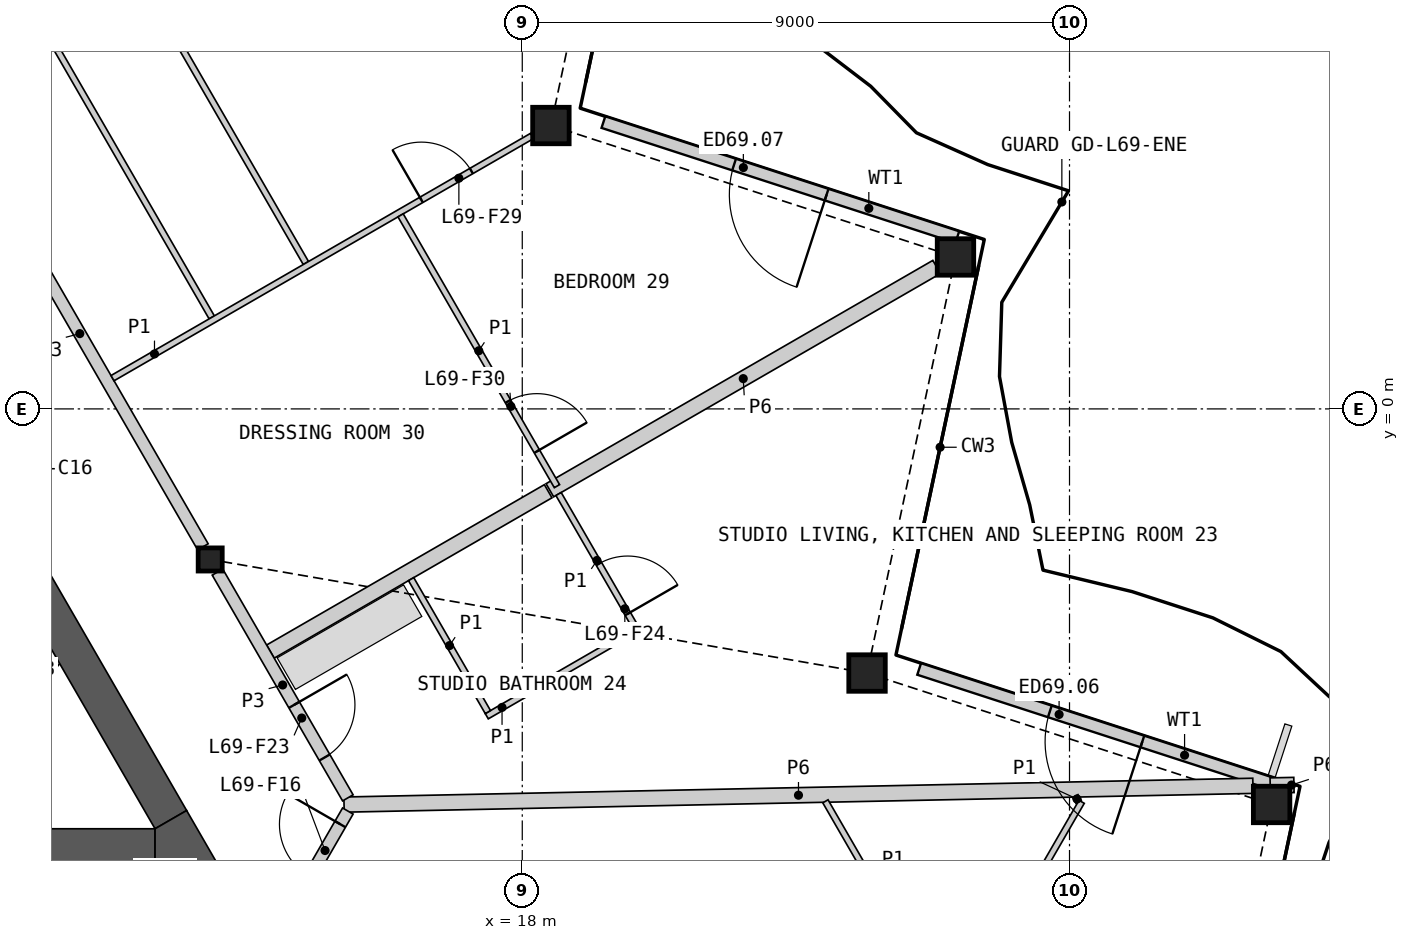
"""IFC4 building model, lengths in metres.
Left out: names, types, materials, properties, quantities, classifications, styles, units other than length and angle.
Written with IfcOpenShell. Run it as: python <this file> out.ifc"""

import sys

from ifc_helpers import new_model, si_unit, direction, frame, frame_2d, origin, origin_2d, place, context, subcontext, project, spatial, polyline, rectangle, hollow_rectangle, i_section, outline, extrude, element, fill, save


model = new_model("IFC4")
c1 = context("Model", 3, precision=1e-05, world=origin(), true_north=direction((0.0, 1.0)))
c2 = subcontext(c1, "Body", "Model", "MODEL_VIEW")
j1 = project(units=[si_unit("LENGTHUNIT", "METRE"), si_unit("PLANEANGLEUNIT", "RADIAN")], contexts=[c1])
p1 = place(None, origin())
s1 = spatial("IfcSite", under=j1, at=p1, CompositionType="ELEMENT")
p2 = place(p1, origin())
s2 = spatial("IfcBuilding", under=s1, at=p2, CompositionType="ELEMENT")
p3 = place(p2, frame((0.0, 0.0, 315.4)))
s3 = spatial("IfcBuildingStorey", under=s2, at=p3, CompositionType="ELEMENT", Elevation=315.4)
for number, where, z_axis, x_axis in (
    (1, (30.324, -6.506, 0.0), (0.0, 0.0, 1.0), (1.0, 0.0, 0.0)),
    (2, (23.67, -4.344, 0.0), (0.0, 0.0, 1.0), (1.0, 0.0, 0.0)),
    (3, (25.125, 2.499, 0.0), (0.0, 0.0, 1.0), (1.0, 0.0, 0.0)),
    (4, (18.471, 4.661, 0.0), (0.0, 0.0, 1.0), (1.0, 0.0, 0.0)),
):
    element("IfcColumn", number, at=place(p3, frame(where, z_axis=z_axis, x_axis=x_axis)), inside=s3, PredefinedType="COLUMN", context=c2, shape_type="SweptSolid", body=[
        extrude(hollow_rectangle(XDim=0.6, YDim=0.6, WallThickness=0.04, at=origin_2d()), origin(), (0.0, 0.0, 1.0), 3.4),
    ])
p4 = place(p3, frame((12.868, -2.476, 0.0), z_axis=(0.0, 0.0, 1.0), x_axis=(1.0, 0.0, 0.0)))
e5 = element("IfcColumn", 5, at=p4, inside=s3, PredefinedType="COLUMN", context=c2, shape_type="SweptSolid", body=[
    extrude(i_section(OverallWidth=0.396, OverallDepth=0.381, WebThickness=0.019, FlangeThickness=0.03, at=origin_2d()), origin(), (0.0, 0.0, 1.0), 3.4),
])
p5 = place(p3, frame((30.347, -6.168, 0.0), z_axis=(0.0, 0.0, 1.0), x_axis=(-0.951053709789, 0.309025631781, 0.0)))
e6 = element("IfcWall", 6, at=p5, inside=s3, PredefinedType="SOLIDWALL", context=c2, shape_type="SweptSolid", body=[
    extrude(rectangle(XDim=6.12, YDim=0.2, at=frame_2d((3.06, 0.0))), origin(), (0.0, 0.0, 1.0), 2.488),
])
p6 = place(p5, frame((2.26, 0.0, 0.0)))
e7 = element("IfcOpeningElement", 7, at=p6, cuts=e6, PredefinedType="OPENING", context=c2, shape_type="SweptSolid", body=[
    extrude(rectangle(XDim=1.6, YDim=2.25, at=frame_2d((0.8, 1.125))), frame((0.0, 0.11, 0.0), z_axis=(0.0, -1.0, 0.0), x_axis=(1.0, 0.0, 0.0)), (0.0, 0.0, 1.0), 0.22),
])
p7 = place(p3, frame((25.155, 2.826, 0.0), z_axis=(0.0, 0.0, 1.0), x_axis=(-0.951053709789, 0.309025631781, 0.0)))
e8 = element("IfcWall", 8, at=p7, inside=s3, PredefinedType="SOLIDWALL", context=c2, shape_type="SweptSolid", body=[
    extrude(rectangle(XDim=6.12, YDim=0.2, at=frame_2d((3.06, 0.0))), origin(), (0.0, 0.0, 1.0), 2.488),
])
p8 = place(p7, frame((2.26, 0.0, 0.0)))
e9 = element("IfcOpeningElement", 9, at=p8, cuts=e8, PredefinedType="OPENING", context=c2, shape_type="SweptSolid", body=[
    extrude(rectangle(XDim=1.6, YDim=2.25, at=frame_2d((0.8, 1.125))), frame((0.0, 0.11, 0.0), z_axis=(0.0, -1.0, 0.0), x_axis=(1.0, 0.0, 0.0)), (0.0, 0.0, 1.0), 0.22),
])
p9 = place(p3, origin())
e10 = element("IfcWall", 10, at=p9, inside=s3, PredefinedType="SHEAR", context=c2, shape_type="SweptSolid", body=[
    extrude(outline(polyline([(8.83, -6.881), (10.374, -4.206), (10.032, -4.298), (8.738, -6.539), (8.83, -6.881)])), origin(), (0.0, 0.0, 1.0), 3.1),
])
p10 = place(p3, origin())
e11 = element("IfcWall", 11, at=p10, inside=s3, PredefinedType="SHEAR", context=c2, shape_type="SweptSolid", body=[
    extrude(outline(polyline([(10.032, -4.298), (10.374, -4.206), (5.307, -1.281), (5.182, -1.498), (10.032, -4.298)])), origin(), (0.0, 0.0, 1.0), 3.1),
])
p11 = place(p3, frame((-11.961, -7.206, 0.0), z_axis=(0.0, 0.0, 1.0), x_axis=(1.0, 0.0, 0.0)))
e12 = element("IfcWall", 12, at=p11, inside=s3, PredefinedType="SHEAR", context=c2, shape_type="SweptSolid", body=[
    extrude(rectangle(XDim=23.921, YDim=0.6, at=frame_2d((11.961, 0.0))), origin(), (0.0, 0.0, 1.0), 3.1),
])
p12 = place(p3, frame((12.221, -6.756, 0.0), z_axis=(0.0, 0.0, 1.0), x_axis=(-0.50000604952, 0.866021911064, 0.0)))
e13 = element("IfcWall", 13, at=p12, inside=s3, PredefinedType="SHEAR", context=c2, shape_type="SweptSolid", body=[
    extrude(rectangle(XDim=4.869, YDim=0.6, at=frame_2d((2.434, 0.0))), origin(), (0.0, 0.0, 1.0), 3.1),
])
p13 = place(p3, origin())
e14 = element("IfcWall", 14, at=p13, inside=s3, PredefinedType="SHEAR", context=c2, shape_type="SweptSolid", body=[
    extrude(outline(polyline([(11.961, -7.506), (11.961, -6.906), (12.48, -6.606), (13.0, -7.506), (11.961, -7.506)])), origin(), (0.0, 0.0, 1.0), 3.1),
])
p14 = place(p3, frame((15.069, -6.508, 0.0), z_axis=(0.0, 0.0, 1.0), x_axis=(0.999786619639, 0.02065708573, 0.0)))
e15 = element("IfcWall", 15, at=p14, inside=s3, PredefinedType="PARTITIONING", context=c2, shape_type="SweptSolid", body=[
    extrude(rectangle(XDim=14.951, YDim=0.25, at=frame_2d((7.475, 0.0))), origin(), (0.0, 0.0, 1.0), 2.33),
])
p15 = place(p3, frame((8.698, 4.745, 0.0), z_axis=(0.0, 0.0, 1.0), x_axis=(0.499984266882, -0.866034487114, 0.0)))
e16 = element("IfcWall", 16, at=p15, inside=s3, PredefinedType="PARTITIONING", context=c2, shape_type="SweptSolid", body=[
    extrude(rectangle(XDim=8.099, YDim=0.2, at=frame_2d((4.049, 0.0))), origin(), (0.0, 0.0, 1.0), 3.1),
])
p16 = place(p3, frame((18.454, -1.338, 0.0), z_axis=(0.0, 0.0, 1.0), x_axis=(0.866023407002, 0.500003458512, 0.0)))
e17 = element("IfcWall", 17, at=p16, inside=s3, PredefinedType="PARTITIONING", context=c2, shape_type="SweptSolid", body=[
    extrude(rectangle(XDim=7.345, YDim=0.25, at=frame_2d((3.673, 0.0))), origin(), (0.0, 0.0, 1.0), 2.33),
])
p17 = place(p3, frame((13.858, -3.991, 0.0), z_axis=(0.0, 0.0, 1.0), x_axis=(0.866032983855, 0.499986870703, 0.0)))
e18 = element("IfcWall", 18, at=p17, inside=s3, PredefinedType="PARTITIONING", context=c2, shape_type="SweptSolid", body=[
    extrude(rectangle(XDim=5.275, YDim=0.25, at=frame_2d((2.638, 0.0))), origin(), (0.0, 0.0, 1.0), 2.33),
])
p18 = place(p3, frame((12.988, -2.684, 0.0), z_axis=(0.0, 0.0, 1.0), x_axis=(0.500003406062, -0.866023437285, 0.0)))
e19 = element("IfcWall", 19, at=p18, inside=s3, PredefinedType="PARTITIONING", context=c2, shape_type="SweptSolid", body=[
    extrude(rectangle(XDim=4.288, YDim=0.2, at=frame_2d((2.144, 0.0))), origin(), (0.0, 0.0, 1.0), 3.1),
])
p19 = place(p18, frame((2.521, 0.0, 0.0)))
e20 = element("IfcOpeningElement", 20, at=p19, cuts=e19, PredefinedType="OPENING", context=c2, shape_type="SweptSolid", body=[
    extrude(rectangle(XDim=1.0, YDim=2.1, at=frame_2d((0.5, 1.05))), frame((0.0, 0.11, 0.0), z_axis=(0.0, -1.0, 0.0), x_axis=(1.0, 0.0, 0.0)), (0.0, 0.0, 1.0), 0.22),
])
p20 = place(p3, frame((13.293, -9.797, 0.0), z_axis=(0.0, 0.0, 1.0), x_axis=(0.499967746641, 0.866044024469, 0.0)))
e21 = element("IfcWall", 21, at=p20, inside=s3, PredefinedType="PARTITIONING", context=c2, shape_type="SweptSolid", body=[
    extrude(rectangle(XDim=3.676, YDim=0.2, at=frame_2d((1.838, 0.0))), origin(), (0.0, 0.0, 1.0), 3.1),
])
p21 = place(p20, frame((2.426, 0.0, 0.0)))
e22 = element("IfcOpeningElement", 22, at=p21, cuts=e21, PredefinedType="OPENING", context=c2, shape_type="SweptSolid", body=[
    extrude(rectangle(XDim=1.0, YDim=2.1, at=frame_2d((0.5, 1.05))), frame((0.0, 0.11, 0.0), z_axis=(0.0, -1.0, 0.0), x_axis=(1.0, 0.0, 0.0)), (0.0, 0.0, 1.0), 0.22),
])
p22 = place(p3, frame((30.301, -6.193, 0.0), z_axis=(0.0, 0.0, 1.0), x_axis=(0.999786840126, 0.020646411592, 0.0)))
e23 = element("IfcWall", 23, at=p22, inside=s3, PredefinedType="PARTITIONING", context=c2, shape_type="SweptSolid", body=[
    extrude(rectangle(XDim=0.39, YDim=0.25, at=frame_2d((0.195, 0.0))), origin(), (0.0, 0.0, 1.0), 2.33),
])
p23 = place(p3, frame((6.74, 15.739, 0.0), z_axis=(0.0, 0.0, 1.0), x_axis=(0.499995022685, -0.86602827742, 0.0)))
e24 = element("IfcWall", 24, at=p23, inside=s3, PredefinedType="PARTITIONING", context=c2, shape_type="SweptSolid", body=[
    extrude(rectangle(XDim=15.404, YDim=0.1, at=frame_2d((7.702, 0.0))), origin(), (0.0, 0.0, 1.0), 2.33),
])
p24 = place(p23, frame((8.582, 0.0, 0.0)))
e25 = element("IfcOpeningElement", 25, at=p24, cuts=e24, PredefinedType="OPENING", context=c2, shape_type="SweptSolid", body=[
    extrude(rectangle(XDim=0.95, YDim=2.1, at=frame_2d((0.475, 1.05))), frame((0.0, 0.06, 0.0), z_axis=(0.0, -1.0, 0.0), x_axis=(1.0, 0.0, 0.0)), (0.0, 0.0, 1.0), 0.12),
])
p25 = place(p3, frame((6.504, 12.572, 0.0), z_axis=(0.0, 0.0, 1.0), x_axis=(0.499998094172, -0.866026504112, 0.0)))
e26 = element("IfcWall", 26, at=p25, inside=s3, PredefinedType="PARTITIONING", context=c2, shape_type="SweptSolid", body=[
    extrude(rectangle(XDim=12.778, YDim=0.1, at=frame_2d((6.389, 0.0))), origin(), (0.0, 0.0, 1.0), 2.33),
])
p26 = place(p25, frame((3.759, 0.0, 0.0)))
e27 = element("IfcOpeningElement", 27, at=p26, cuts=e26, PredefinedType="OPENING", context=c2, shape_type="SweptSolid", body=[
    extrude(rectangle(XDim=0.95, YDim=2.1, at=frame_2d((0.475, 1.05))), frame((0.0, 0.06, 0.0), z_axis=(0.0, -1.0, 0.0), x_axis=(1.0, 0.0, 0.0)), (0.0, 0.0, 1.0), 0.12),
])
p27 = place(p3, frame((11.261, 0.506, 0.0), z_axis=(0.0, 0.0, 1.0), x_axis=(0.866024323732, 0.500001870701, 0.0)))
e28 = element("IfcWall", 28, at=p27, inside=s3, PredefinedType="PARTITIONING", context=c2, shape_type="SweptSolid", body=[
    extrude(rectangle(XDim=7.967, YDim=0.1, at=frame_2d((3.983, 0.0))), origin(), (0.0, 0.0, 1.0), 2.33),
])
p28 = place(p27, frame((5.865, 0.0, 0.0)))
e29 = element("IfcOpeningElement", 29, at=p28, cuts=e28, PredefinedType="OPENING", context=c2, shape_type="SweptSolid", body=[
    extrude(rectangle(XDim=0.95, YDim=2.1, at=frame_2d((0.475, 1.05))), frame((0.0, 0.06, 0.0), z_axis=(0.0, -1.0, 0.0), x_axis=(1.0, 0.0, 0.0)), (0.0, 0.0, 1.0), 0.12),
])
p29 = place(p3, frame((23.223, -13.35, 0.0), z_axis=(0.0, 0.0, 1.0), x_axis=(0.500018284498, 0.866014846967, 0.0)))
e30 = element("IfcWall", 30, at=p29, inside=s3, PredefinedType="PARTITIONING", context=c2, shape_type="SweptSolid", body=[
    extrude(rectangle(XDim=7.953, YDim=0.1, at=frame_2d((3.977, 0.0))), origin(), (0.0, 0.0, 1.0), 2.33),
])
p30 = place(p29, frame((1.951, 0.0, 0.0)))
e31 = element("IfcOpeningElement", 31, at=p30, cuts=e30, PredefinedType="OPENING", context=c2, shape_type="SweptSolid", body=[
    extrude(rectangle(XDim=0.95, YDim=2.1, at=frame_2d((0.475, 1.05))), frame((0.0, 0.06, 0.0), z_axis=(0.0, -1.0, 0.0), x_axis=(1.0, 0.0, 0.0)), (0.0, 0.0, 1.0), 0.12),
])
p31 = place(p3, frame((15.999, 3.183, 0.0), z_axis=(0.0, 0.0, 1.0), x_axis=(0.500014207086, -0.866017201164, 0.0)))
e32 = element("IfcWall", 32, at=p31, inside=s3, PredefinedType="PARTITIONING", context=c2, shape_type="SweptSolid", body=[
    extrude(rectangle(XDim=5.143, YDim=0.1, at=frame_2d((2.571, 0.0))), origin(), (0.0, 0.0, 1.0), 2.33),
])
p32 = place(p31, frame((3.532, 0.0, 0.0)))
e33 = element("IfcOpeningElement", 33, at=p32, cuts=e32, PredefinedType="OPENING", context=c2, shape_type="SweptSolid", body=[
    extrude(rectangle(XDim=0.95, YDim=2.1, at=frame_2d((0.475, 1.05))), frame((0.0, 0.06, 0.0), z_axis=(0.0, -1.0, 0.0), x_axis=(1.0, 0.0, 0.0)), (0.0, 0.0, 1.0), 0.12),
])
p33 = place(p3, frame((22.986, -6.454, 0.0), z_axis=(0.0, 0.0, 1.0), x_axis=(0.499978833458, -0.866037623948, 0.0)))
e34 = element("IfcWall", 34, at=p33, inside=s3, PredefinedType="PARTITIONING", context=c2, shape_type="SweptSolid", body=[
    extrude(rectangle(XDim=3.05, YDim=0.1, at=frame_2d((1.525, 0.0))), origin(), (0.0, 0.0, 1.0), 2.33),
])
p34 = place(p3, frame((17.416, -5.055, 0.0), z_axis=(0.0, 0.0, 1.0), x_axis=(0.866032775405, 0.499987231761, 0.0)))
e35 = element("IfcWall", 35, at=p34, inside=s3, PredefinedType="PARTITIONING", context=c2, shape_type="SweptSolid", body=[
    extrude(rectangle(XDim=2.9, YDim=0.1, at=frame_2d((1.45, 0.0))), origin(), (0.0, 0.0, 1.0), 2.33),
])
p35 = place(p3, frame((16.172, -2.8, 0.0), z_axis=(0.0, 0.0, 1.0), x_axis=(0.50001820224, -0.866014894461, 0.0)))
e36 = element("IfcWall", 36, at=p35, inside=s3, PredefinedType="PARTITIONING", context=c2, shape_type="SweptSolid", body=[
    extrude(rectangle(XDim=2.525, YDim=0.1, at=frame_2d((1.262, 0.0))), origin(), (0.0, 0.0, 1.0), 2.33),
])
p36 = place(p3, frame((18.597, -1.4, 0.0), z_axis=(0.0, 0.0, 1.0), x_axis=(0.499976333282, -0.866039067339, 0.0)))
e37 = element("IfcWall", 37, at=p36, inside=s3, PredefinedType="PARTITIONING", context=c2, shape_type="SweptSolid", body=[
    extrude(rectangle(XDim=2.525, YDim=0.1, at=frame_2d((1.262, 0.0))), origin(), (0.0, 0.0, 1.0), 2.33),
])
p37 = place(p36, frame((1.325, 0.0, 0.0)))
e38 = element("IfcOpeningElement", 38, at=p37, cuts=e37, PredefinedType="OPENING", context=c2, shape_type="SweptSolid", body=[
    extrude(rectangle(XDim=0.95, YDim=2.1, at=frame_2d((0.475, 1.05))), frame((0.0, 0.06, 0.0), z_axis=(0.0, -1.0, 0.0), x_axis=(1.0, 0.0, 0.0)), (0.0, 0.0, 1.0), 0.12),
])
p38 = place(p3, frame((27.096, -6.369, 0.0), z_axis=(0.0, 0.0, 1.0), x_axis=(0.500768285049, -0.865581379588, 0.0)))
e39 = element("IfcWall", 39, at=p38, inside=s3, PredefinedType="PARTITIONING", context=c2, shape_type="SweptSolid", body=[
    extrude(rectangle(XDim=0.108, YDim=0.1, at=frame_2d((0.054, 0.0))), origin(), (0.0, 0.0, 1.0), 2.33),
])
p39 = place(p6, origin())
e40 = element("IfcDoor", 40, at=p39, inside=s3, OperationType="DOUBLE_DOOR_SINGLE_SWING", PredefinedType="DOOR", context=c2, shape_type="SweptSolid", body=[
    extrude(rectangle(XDim=1.6, YDim=2.25, at=frame_2d((0.8, 1.125))), frame((0.0, 0.025, 0.0), z_axis=(0.0, -1.0, 0.0), x_axis=(1.0, 0.0, 0.0)), (0.0, 0.0, 1.0), 0.05),
])
fill(e7, e40)
p40 = place(p8, origin())
e41 = element("IfcDoor", 41, at=p40, inside=s3, OperationType="DOUBLE_DOOR_SINGLE_SWING", PredefinedType="DOOR", context=c2, shape_type="SweptSolid", body=[
    extrude(rectangle(XDim=1.6, YDim=2.25, at=frame_2d((0.8, 1.125))), frame((0.0, 0.025, 0.0), z_axis=(0.0, -1.0, 0.0), x_axis=(1.0, 0.0, 0.0)), (0.0, 0.0, 1.0), 0.05),
])
fill(e9, e41)
p41 = place(p21, origin())
e42 = element("IfcDoor", 42, at=p41, inside=s3, OperationType="SINGLE_SWING_RIGHT", PredefinedType="DOOR", context=c2, shape_type="SweptSolid", body=[
    extrude(rectangle(XDim=1.0, YDim=2.1, at=frame_2d((0.5, 1.05))), frame((0.0, 0.025, 0.0), z_axis=(0.0, -1.0, 0.0), x_axis=(1.0, 0.0, 0.0)), (0.0, 0.0, 1.0), 0.05),
])
fill(e22, e42)
p42 = place(p19, origin())
e43 = element("IfcDoor", 43, at=p42, inside=s3, OperationType="SINGLE_SWING_LEFT", PredefinedType="DOOR", context=c2, shape_type="SweptSolid", body=[
    extrude(rectangle(XDim=1.0, YDim=2.1, at=frame_2d((0.5, 1.05))), frame((0.0, 0.025, 0.0), z_axis=(0.0, -1.0, 0.0), x_axis=(1.0, 0.0, 0.0)), (0.0, 0.0, 1.0), 0.05),
])
fill(e20, e43)
p43 = place(p37, origin())
e44 = element("IfcDoor", 44, at=p43, inside=s3, OperationType="SINGLE_SWING_RIGHT", PredefinedType="DOOR", context=c2, shape_type="SweptSolid", body=[
    extrude(rectangle(XDim=0.95, YDim=2.1, at=frame_2d((0.475, 1.05))), frame((0.0, 0.025, 0.0), z_axis=(0.0, -1.0, 0.0), x_axis=(1.0, 0.0, 0.0)), (0.0, 0.0, 1.0), 0.05),
])
fill(e38, e44)
p44 = place(p28, origin())
e45 = element("IfcDoor", 45, at=p44, inside=s3, OperationType="SINGLE_SWING_LEFT", PredefinedType="DOOR", context=c2, shape_type="SweptSolid", body=[
    extrude(rectangle(XDim=0.95, YDim=2.1, at=frame_2d((0.475, 1.05))), frame((0.0, 0.025, 0.0), z_axis=(0.0, -1.0, 0.0), x_axis=(1.0, 0.0, 0.0)), (0.0, 0.0, 1.0), 0.05),
])
fill(e29, e45)
p45 = place(p32, origin())
e46 = element("IfcDoor", 46, at=p45, inside=s3, OperationType="SINGLE_SWING_RIGHT", PredefinedType="DOOR", context=c2, shape_type="SweptSolid", body=[
    extrude(rectangle(XDim=0.95, YDim=2.1, at=frame_2d((0.475, 1.05))), frame((0.0, 0.025, 0.0), z_axis=(0.0, -1.0, 0.0), x_axis=(1.0, 0.0, 0.0)), (0.0, 0.0, 1.0), 0.05),
])
fill(e33, e46)
save(model, sys.argv[1])
